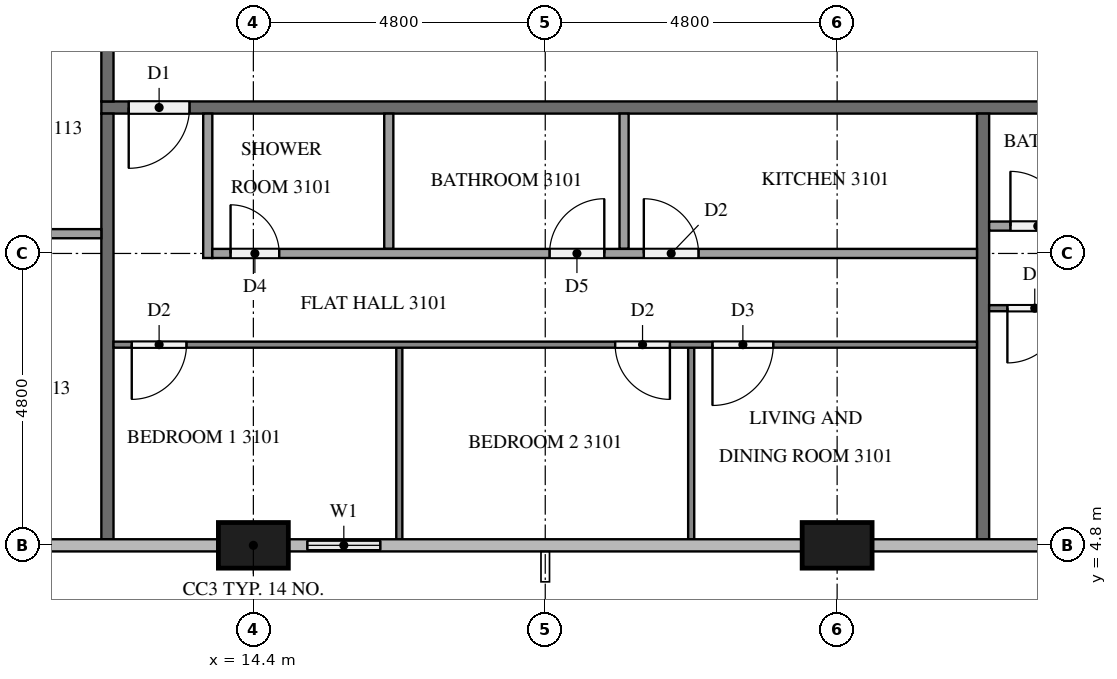
"""IFC4 building model, lengths in metres.
Left out: names, types, materials, properties, quantities, classifications, styles, units other than length and angle.
Written with IfcOpenShell. Run it as: python <this file> out.ifc"""

import sys

from ifc_helpers import new_model, si_unit, direction, frame, frame_2d, origin, origin_2d, place, context, subcontext, project, spatial, rectangle, extrude, element, fill, save


model = new_model("IFC4")
c1 = context("Model", 3, precision=1e-05, world=origin(), true_north=direction((0.0, 1.0)))
c2 = subcontext(c1, "Body", "Model", "MODEL_VIEW")
j1 = project(units=[si_unit("LENGTHUNIT", "METRE"), si_unit("PLANEANGLEUNIT", "RADIAN")], contexts=[c1])
p1 = place(None, origin())
s1 = spatial("IfcSite", under=j1, at=p1, CompositionType="ELEMENT")
p2 = place(p1, origin())
s2 = spatial("IfcBuilding", under=s1, at=p2, CompositionType="ELEMENT")
p3 = place(p2, frame((0.0, 0.0, 122.6)))
s3 = spatial("IfcBuildingStorey", under=s2, at=p3, CompositionType="ELEMENT", Elevation=122.6)
for number, where, z_axis, x_axis in (
    (1, (14.4, 4.8, 0.0), (0.0, 0.0, 1.0), (1.0, 0.0, 0.0)),
    (2, (24.0, 4.8, 0.0), (0.0, 0.0, 1.0), (1.0, 0.0, 0.0)),
):
    element("IfcColumn", number, at=place(p3, frame(where, z_axis=z_axis, x_axis=x_axis)), inside=s3, PredefinedType="COLUMN", context=c2, shape_type="SweptSolid", body=[
        extrude(rectangle(XDim=1.15, YDim=0.75, at=origin_2d()), origin(), (0.0, 0.0, 1.0), 3.2),
    ])
p4 = place(p3, frame((14.975, 4.8, 0.0), z_axis=(0.0, 0.0, 1.0), x_axis=(1.0, 0.0, 0.0)))
e3 = element("IfcWall", 3, at=p4, inside=s3, PredefinedType="SOLIDWALL", context=c2, shape_type="SweptSolid", body=[
    extrude(rectangle(XDim=1.825, YDim=0.15, at=frame_2d((0.913, 0.0))), origin(), (0.0, 0.0, 1.0), 3.2),
])
p5 = place(p4, frame((0.312, 0.0, 0.9)))
e4 = element("IfcOpeningElement", 4, at=p5, cuts=e3, PredefinedType="OPENING", context=c2, shape_type="SweptSolid", body=[
    extrude(rectangle(XDim=1.2, YDim=1.4, at=frame_2d((0.6, 0.7))), frame((0.0, 0.085, 0.0), z_axis=(0.0, -1.0, 0.0), x_axis=(1.0, 0.0, 0.0)), (0.0, 0.0, 1.0), 0.17),
])
p6 = place(p3, frame((50.5, 12.0, 0.0), z_axis=(0.0, 0.0, 1.0), x_axis=(-1.0, 0.0, 0.0)))
e5 = element("IfcWall", 5, at=p6, inside=s3, PredefinedType="PARTITIONING", context=c2, shape_type="SweptSolid", body=[
    extrude(rectangle(XDim=38.6, YDim=0.2, at=frame_2d((19.3, 0.0))), origin(), (0.0, 0.0, 1.0), 3.2),
])
p7 = place(p6, frame((37.15, 0.0, 0.0)))
e6 = element("IfcOpeningElement", 6, at=p7, cuts=e5, PredefinedType="OPENING", context=c2, shape_type="SweptSolid", body=[
    extrude(rectangle(XDim=1.0, YDim=2.1, at=frame_2d((0.5, 1.05))), frame((0.0, 0.11, 0.0), z_axis=(0.0, -1.0, 0.0), x_axis=(1.0, 0.0, 0.0)), (0.0, 0.0, 1.0), 0.22),
])
p8 = place(p6, frame((7.65, 0.0, 0.0)))
e7 = element("IfcOpeningElement", 7, at=p8, cuts=e5, PredefinedType="OPENING", context=c2, shape_type="SweptSolid", body=[
    extrude(rectangle(XDim=1.0, YDim=2.1, at=frame_2d((0.5, 1.05))), frame((0.0, 0.11, 0.0), z_axis=(0.0, -1.0, 0.0), x_axis=(1.0, 0.0, 0.0)), (0.0, 0.0, 1.0), 0.22),
])
p9 = place(p6, frame((5.95, 0.0, 0.0)))
e8 = element("IfcOpeningElement", 8, at=p9, cuts=e5, PredefinedType="OPENING", context=c2, shape_type="SweptSolid", body=[
    extrude(rectangle(XDim=1.0, YDim=2.1, at=frame_2d((0.5, 1.05))), frame((0.0, 0.11, 0.0), z_axis=(0.0, -1.0, 0.0), x_axis=(1.0, 0.0, 0.0)), (0.0, 0.0, 1.0), 0.22),
])
p10 = place(p3, frame((12.0, 12.1, 0.0), z_axis=(0.0, 0.0, 1.0), x_axis=(0.0, 1.0, 0.0)))
e9 = element("IfcWall", 9, at=p10, inside=s3, PredefinedType="PARTITIONING", context=c2, shape_type="SweptSolid", body=[
    extrude(rectangle(XDim=2.8, YDim=0.2, at=frame_2d((1.4, 0.0))), origin(), (0.0, 0.0, 1.0), 3.2),
])
p11 = place(p10, frame((1.55, 0.0, 0.0)))
e10 = element("IfcOpeningElement", 10, at=p11, cuts=e9, PredefinedType="OPENING", context=c2, shape_type="SweptSolid", body=[
    extrude(rectangle(XDim=1.0, YDim=2.1, at=frame_2d((0.5, 1.05))), frame((0.0, 0.11, 0.0), z_axis=(0.0, -1.0, 0.0), x_axis=(1.0, 0.0, 0.0)), (0.0, 0.0, 1.0), 0.22),
])
for number, where, z_axis, x_axis in (
    (11, (26.4, 11.9, 0.0), (0.0, 0.0, 1.0), (0.0, -1.0, 0.0)),
    (12, (12.0, 4.9, 0.0), (0.0, 0.0, 1.0), (0.0, 1.0, 0.0)),
):
    element("IfcWall", number, at=place(p3, frame(where, z_axis=z_axis, x_axis=x_axis)), inside=s3, PredefinedType="PARTITIONING", context=c2, shape_type="SweptSolid", body=[
        extrude(rectangle(XDim=7.0, YDim=0.2, at=frame_2d((3.5, 0.0))), origin(), (0.0, 0.0, 1.0), 3.2),
    ])
for number, where, z_axis, x_axis in (
    (13, (16.8, 8.05, 0.0), (0.0, 0.0, 1.0), (0.0, -1.0, 0.0)),
    (14, (21.6, 8.05, 0.0), (0.0, 0.0, 1.0), (0.0, -1.0, 0.0)),
):
    element("IfcWall", number, at=place(p3, frame(where, z_axis=z_axis, x_axis=x_axis)), inside=s3, PredefinedType="PARTITIONING", context=c2, shape_type="SweptSolid", body=[
        extrude(rectangle(XDim=3.15, YDim=0.1, at=frame_2d((1.575, 0.0))), origin(), (0.0, 0.0, 1.0), 3.2),
    ])
p12 = place(p3, frame((26.3, 8.1, 0.0), z_axis=(0.0, 0.0, 1.0), x_axis=(-1.0, 0.0, 0.0)))
e15 = element("IfcWall", 15, at=p12, inside=s3, PredefinedType="PARTITIONING", context=c2, shape_type="SweptSolid", body=[
    extrude(rectangle(XDim=14.2, YDim=0.1, at=frame_2d((7.1, 0.0))), origin(), (0.0, 0.0, 1.0), 3.2),
])
p13 = place(p12, frame((13.0, 0.0, 0.0)))
e16 = element("IfcOpeningElement", 16, at=p13, cuts=e15, PredefinedType="OPENING", context=c2, shape_type="SweptSolid", body=[
    extrude(rectangle(XDim=0.9, YDim=2.1, at=frame_2d((0.45, 1.05))), frame((0.0, 0.06, 0.0), z_axis=(0.0, -1.0, 0.0), x_axis=(1.0, 0.0, 0.0)), (0.0, 0.0, 1.0), 0.12),
])
p14 = place(p12, frame((5.05, 0.0, 0.0)))
e17 = element("IfcOpeningElement", 17, at=p14, cuts=e15, PredefinedType="OPENING", context=c2, shape_type="SweptSolid", body=[
    extrude(rectangle(XDim=0.9, YDim=2.1, at=frame_2d((0.45, 1.05))), frame((0.0, 0.06, 0.0), z_axis=(0.0, -1.0, 0.0), x_axis=(1.0, 0.0, 0.0)), (0.0, 0.0, 1.0), 0.12),
])
p15 = place(p12, frame((3.35, 0.0, 0.0)))
e18 = element("IfcOpeningElement", 18, at=p15, cuts=e15, PredefinedType="OPENING", context=c2, shape_type="SweptSolid", body=[
    extrude(rectangle(XDim=1.0, YDim=2.1, at=frame_2d((0.5, 1.05))), frame((0.0, 0.06, 0.0), z_axis=(0.0, -1.0, 0.0), x_axis=(1.0, 0.0, 0.0)), (0.0, 0.0, 1.0), 0.12),
])
for number, where, z_axis, x_axis in (
    (19, (16.627, 11.9, 0.0), (0.0, 0.0, 1.0), (0.0, -1.0, 0.0)),
    (20, (20.496, 11.9, 0.0), (0.0, 0.0, 1.0), (0.0, -1.0, 0.0)),
):
    element("IfcWall", number, at=place(p3, frame(where, z_axis=z_axis, x_axis=x_axis)), inside=s3, PredefinedType="PARTITIONING", context=c2, shape_type="SweptSolid", body=[
        extrude(rectangle(XDim=2.225, YDim=0.15, at=frame_2d((1.112, 0.0))), origin(), (0.0, 0.0, 1.0), 3.2),
    ])
p16 = place(p3, frame((13.65, 11.9, 0.0), z_axis=(0.0, 0.0, 1.0), x_axis=(0.0, -1.0, 0.0)))
e21 = element("IfcWall", 21, at=p16, inside=s3, PredefinedType="PARTITIONING", context=c2, shape_type="SweptSolid", body=[
    extrude(rectangle(XDim=2.375, YDim=0.15, at=frame_2d((1.188, 0.0))), origin(), (0.0, 0.0, 1.0), 3.2),
])
p17 = place(p3, frame((13.725, 9.6, 0.0), z_axis=(0.0, 0.0, 1.0), x_axis=(1.0, 0.0, 0.0)))
e22 = element("IfcWall", 22, at=p17, inside=s3, PredefinedType="PARTITIONING", context=c2, shape_type="SweptSolid", body=[
    extrude(rectangle(XDim=12.575, YDim=0.15, at=frame_2d((6.288, 0.0))), origin(), (0.0, 0.0, 1.0), 3.2),
])
p18 = place(p17, frame((0.3, 0.0, 0.0)))
e23 = element("IfcOpeningElement", 23, at=p18, cuts=e22, PredefinedType="OPENING", context=c2, shape_type="SweptSolid", body=[
    extrude(rectangle(XDim=0.8, YDim=2.1, at=frame_2d((0.4, 1.05))), frame((0.0, 0.085, 0.0), z_axis=(0.0, -1.0, 0.0), x_axis=(1.0, 0.0, 0.0)), (0.0, 0.0, 1.0), 0.17),
])
p19 = place(p17, frame((5.546, 0.0, 0.0)))
e24 = element("IfcOpeningElement", 24, at=p19, cuts=e22, PredefinedType="OPENING", context=c2, shape_type="SweptSolid", body=[
    extrude(rectangle(XDim=0.9, YDim=2.1, at=frame_2d((0.45, 1.05))), frame((0.0, 0.085, 0.0), z_axis=(0.0, -1.0, 0.0), x_axis=(1.0, 0.0, 0.0)), (0.0, 0.0, 1.0), 0.17),
])
p20 = place(p17, frame((7.096, 0.0, 0.0)))
e25 = element("IfcOpeningElement", 25, at=p20, cuts=e22, PredefinedType="OPENING", context=c2, shape_type="SweptSolid", body=[
    extrude(rectangle(XDim=0.9, YDim=2.1, at=frame_2d((0.45, 1.05))), frame((0.0, 0.085, 0.0), z_axis=(0.0, -1.0, 0.0), x_axis=(1.0, 0.0, 0.0)), (0.0, 0.0, 1.0), 0.17),
])
p21 = place(p3, frame((43.1, 8.7, 0.0), z_axis=(0.0, 0.0, 1.0), x_axis=(-1.0, 0.0, 0.0)))
e26 = element("IfcWall", 26, at=p21, inside=s3, PredefinedType="PARTITIONING", context=c2, shape_type="SweptSolid", body=[
    extrude(rectangle(XDim=16.6, YDim=0.1, at=frame_2d((8.3, 0.0))), origin(), (0.0, 0.0, 1.0), 3.2),
])
p22 = place(p21, frame((3.45, 0.0, 0.0)))
e27 = element("IfcOpeningElement", 27, at=p22, cuts=e26, PredefinedType="OPENING", context=c2, shape_type="SweptSolid", body=[
    extrude(rectangle(XDim=0.9, YDim=2.1, at=frame_2d((0.45, 1.05))), frame((0.0, 0.06, 0.0), z_axis=(0.0, -1.0, 0.0), x_axis=(1.0, 0.0, 0.0)), (0.0, 0.0, 1.0), 0.12),
])
p23 = place(p21, frame((5.05, 0.0, 0.0)))
e28 = element("IfcOpeningElement", 28, at=p23, cuts=e26, PredefinedType="OPENING", context=c2, shape_type="SweptSolid", body=[
    extrude(rectangle(XDim=1.0, YDim=2.1, at=frame_2d((0.5, 1.05))), frame((0.0, 0.06, 0.0), z_axis=(0.0, -1.0, 0.0), x_axis=(1.0, 0.0, 0.0)), (0.0, 0.0, 1.0), 0.12),
])
p24 = place(p21, frame((15.4, 0.0, 0.0)))
e29 = element("IfcOpeningElement", 29, at=p24, cuts=e26, PredefinedType="OPENING", context=c2, shape_type="SweptSolid", body=[
    extrude(rectangle(XDim=0.9, YDim=2.1, at=frame_2d((0.45, 1.05))), frame((0.0, 0.06, 0.0), z_axis=(0.0, -1.0, 0.0), x_axis=(1.0, 0.0, 0.0)), (0.0, 0.0, 1.0), 0.12),
])
p25 = place(p3, frame((26.5, 10.05, 0.0), z_axis=(0.0, 0.0, 1.0), x_axis=(1.0, 0.0, 0.0)))
e30 = element("IfcWall", 30, at=p25, inside=s3, PredefinedType="PARTITIONING", context=c2, shape_type="SweptSolid", body=[
    extrude(rectangle(XDim=14.975, YDim=0.15, at=frame_2d((7.488, 0.0))), origin(), (0.0, 0.0, 1.0), 3.2),
])
p26 = place(p25, frame((8.388, 0.0, 0.0)))
e31 = element("IfcOpeningElement", 31, at=p26, cuts=e30, PredefinedType="OPENING", context=c2, shape_type="SweptSolid", body=[
    extrude(rectangle(XDim=0.9, YDim=2.1, at=frame_2d((0.45, 1.05))), frame((0.0, 0.085, 0.0), z_axis=(0.0, -1.0, 0.0), x_axis=(1.0, 0.0, 0.0)), (0.0, 0.0, 1.0), 0.17),
])
p27 = place(p25, frame((6.938, 0.0, 0.0)))
e32 = element("IfcOpeningElement", 32, at=p27, cuts=e30, PredefinedType="OPENING", context=c2, shape_type="SweptSolid", body=[
    extrude(rectangle(XDim=0.8, YDim=2.1, at=frame_2d((0.4, 1.05))), frame((0.0, 0.085, 0.0), z_axis=(0.0, -1.0, 0.0), x_axis=(1.0, 0.0, 0.0)), (0.0, 0.0, 1.0), 0.17),
])
p28 = place(p25, frame((0.35, 0.0, 0.0)))
e33 = element("IfcOpeningElement", 33, at=p28, cuts=e30, PredefinedType="OPENING", context=c2, shape_type="SweptSolid", body=[
    extrude(rectangle(XDim=0.9, YDim=2.1, at=frame_2d((0.45, 1.05))), frame((0.0, 0.085, 0.0), z_axis=(0.0, -1.0, 0.0), x_axis=(1.0, 0.0, 0.0)), (0.0, 0.0, 1.0), 0.17),
])
p29 = place(p3, frame((11.9, 9.925, 0.0), z_axis=(0.0, 0.0, 1.0), x_axis=(-1.0, 0.0, 0.0)))
e34 = element("IfcWall", 34, at=p29, inside=s3, PredefinedType="PARTITIONING", context=c2, shape_type="SweptSolid", body=[
    extrude(rectangle(XDim=3.125, YDim=0.15, at=frame_2d((1.562, 0.0))), origin(), (0.0, 0.0, 1.0), 3.2),
])
p30 = place(p5, origin())
e35 = element("IfcWindow", 35, at=p30, inside=s3, PartitioningType="SINGLE_PANEL", PredefinedType="WINDOW", context=c2, shape_type="SweptSolid", body=[
    extrude(rectangle(XDim=1.2, YDim=1.4, at=frame_2d((0.6, 0.7))), frame((0.0, 0.03, 0.0), z_axis=(0.0, -1.0, 0.0), x_axis=(1.0, 0.0, 0.0)), (0.0, 0.0, 1.0), 0.06),
])
fill(e4, e35)
p31 = place(p7, origin())
e36 = element("IfcDoor", 36, at=p31, inside=s3, OperationType="SINGLE_SWING_RIGHT", PredefinedType="DOOR", context=c2, shape_type="SweptSolid", body=[
    extrude(rectangle(XDim=1.0, YDim=2.1, at=frame_2d((0.5, 1.05))), frame((0.0, 0.025, 0.0), z_axis=(0.0, -1.0, 0.0), x_axis=(1.0, 0.0, 0.0)), (0.0, 0.0, 1.0), 0.05),
])
fill(e6, e36)
p32 = place(p13, origin())
e37 = element("IfcDoor", 37, at=p32, inside=s3, OperationType="SINGLE_SWING_RIGHT", PredefinedType="DOOR", context=c2, shape_type="SweptSolid", body=[
    extrude(rectangle(XDim=0.9, YDim=2.1, at=frame_2d((0.45, 1.05))), frame((0.0, 0.025, 0.0), z_axis=(0.0, -1.0, 0.0), x_axis=(1.0, 0.0, 0.0)), (0.0, 0.0, 1.0), 0.05),
])
fill(e16, e37)
p33 = place(p14, origin())
e38 = element("IfcDoor", 38, at=p33, inside=s3, OperationType="SINGLE_SWING_LEFT", PredefinedType="DOOR", context=c2, shape_type="SweptSolid", body=[
    extrude(rectangle(XDim=0.9, YDim=2.1, at=frame_2d((0.45, 1.05))), frame((0.0, 0.025, 0.0), z_axis=(0.0, -1.0, 0.0), x_axis=(1.0, 0.0, 0.0)), (0.0, 0.0, 1.0), 0.05),
])
fill(e17, e38)
p34 = place(p15, origin())
e39 = element("IfcDoor", 39, at=p34, inside=s3, OperationType="SINGLE_SWING_RIGHT", PredefinedType="DOOR", context=c2, shape_type="SweptSolid", body=[
    extrude(rectangle(XDim=1.0, YDim=2.1, at=frame_2d((0.5, 1.05))), frame((0.0, 0.025, 0.0), z_axis=(0.0, -1.0, 0.0), x_axis=(1.0, 0.0, 0.0)), (0.0, 0.0, 1.0), 0.05),
])
fill(e18, e39)
p35 = place(p18, origin())
e40 = element("IfcDoor", 40, at=p35, inside=s3, OperationType="SINGLE_SWING_LEFT", PredefinedType="DOOR", context=c2, shape_type="SweptSolid", body=[
    extrude(rectangle(XDim=0.8, YDim=2.1, at=frame_2d((0.4, 1.05))), frame((0.0, 0.025, 0.0), z_axis=(0.0, -1.0, 0.0), x_axis=(1.0, 0.0, 0.0)), (0.0, 0.0, 1.0), 0.05),
])
fill(e23, e40)
p36 = place(p19, origin())
e41 = element("IfcDoor", 41, at=p36, inside=s3, OperationType="SINGLE_SWING_RIGHT", PredefinedType="DOOR", context=c2, shape_type="SweptSolid", body=[
    extrude(rectangle(XDim=0.9, YDim=2.1, at=frame_2d((0.45, 1.05))), frame((0.0, 0.025, 0.0), z_axis=(0.0, -1.0, 0.0), x_axis=(1.0, 0.0, 0.0)), (0.0, 0.0, 1.0), 0.05),
])
fill(e24, e41)
p37 = place(p20, origin())
e42 = element("IfcDoor", 42, at=p37, inside=s3, OperationType="SINGLE_SWING_LEFT", PredefinedType="DOOR", context=c2, shape_type="SweptSolid", body=[
    extrude(rectangle(XDim=0.9, YDim=2.1, at=frame_2d((0.45, 1.05))), frame((0.0, 0.025, 0.0), z_axis=(0.0, -1.0, 0.0), x_axis=(1.0, 0.0, 0.0)), (0.0, 0.0, 1.0), 0.05),
])
fill(e25, e42)
p38 = place(p24, origin())
e43 = element("IfcDoor", 43, at=p38, inside=s3, OperationType="SINGLE_SWING_RIGHT", PredefinedType="DOOR", context=c2, shape_type="SweptSolid", body=[
    extrude(rectangle(XDim=0.9, YDim=2.1, at=frame_2d((0.45, 1.05))), frame((0.0, 0.025, 0.0), z_axis=(0.0, -1.0, 0.0), x_axis=(1.0, 0.0, 0.0)), (0.0, 0.0, 1.0), 0.05),
])
fill(e29, e43)
p39 = place(p28, origin())
e44 = element("IfcDoor", 44, at=p39, inside=s3, OperationType="SINGLE_SWING_LEFT", PredefinedType="DOOR", context=c2, shape_type="SweptSolid", body=[
    extrude(rectangle(XDim=0.9, YDim=2.1, at=frame_2d((0.45, 1.05))), frame((0.0, 0.025, 0.0), z_axis=(0.0, -1.0, 0.0), x_axis=(1.0, 0.0, 0.0)), (0.0, 0.0, 1.0), 0.05),
])
fill(e33, e44)
save(model, sys.argv[1])
